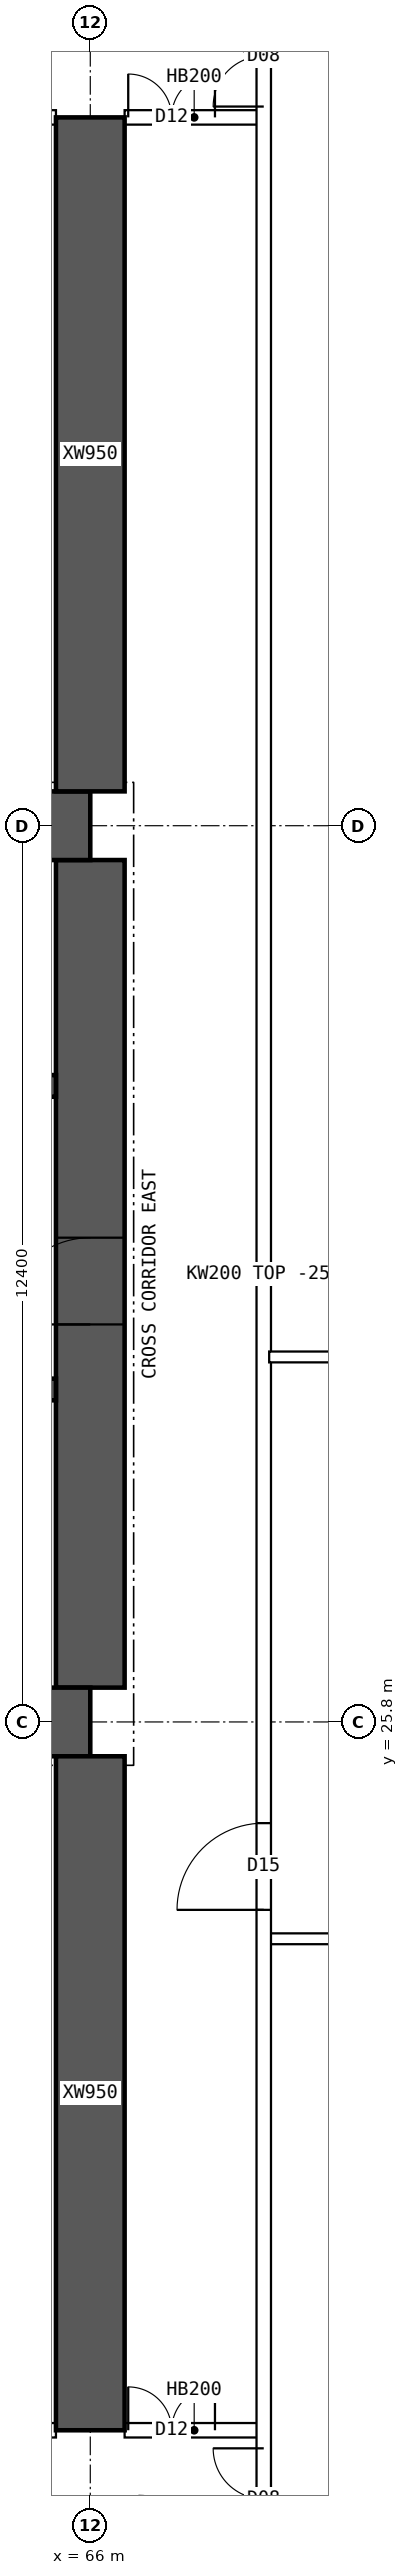
"""IFC4 building model, lengths in metres.
Left out: names, types, materials, properties, quantities, classifications, styles, units other than length and angle.
Written with IfcOpenShell. Run it as: python <this file> out.ifc"""

import sys

from ifc_helpers import new_model, si_unit, direction, frame, frame_2d, origin, place, context, subcontext, project, spatial, polyline, rectangle, outline, extrude, element, fill, save


model = new_model("IFC4")
c1 = context("Model", 3, precision=1e-05, world=origin(), true_north=direction((0.0, 1.0)))
c2 = subcontext(c1, "Body", "Model", "MODEL_VIEW")
j1 = project(units=[si_unit("LENGTHUNIT", "METRE"), si_unit("PLANEANGLEUNIT", "RADIAN")], contexts=[c1])
p1 = place(None, origin())
s1 = spatial("IfcSite", under=j1, at=p1, CompositionType="ELEMENT")
p2 = place(p1, origin())
s2 = spatial("IfcBuilding", under=s1, at=p2, CompositionType="ELEMENT")
p3 = place(p2, frame((0.0, 0.0, 118.15)))
s3 = spatial("IfcBuildingStorey", under=s2, at=p3, CompositionType="ELEMENT", Elevation=118.15)
for number, where, z_axis, x_axis in (
    (1, (18.0, 25.8, 0.0), (0.0, 0.0, 1.0), (1.0, 0.0, 0.0)),
    (2, (18.0, 38.2, 0.0), (0.0, 0.0, 1.0), (1.0, 0.0, 0.0)),
):
    element("IfcWall", number, at=place(p3, frame(where, z_axis=z_axis, x_axis=x_axis)), inside=s3, PredefinedType="SHEAR", context=c2, shape_type="SweptSolid", body=[
        extrude(rectangle(XDim=48.0, YDim=0.95, at=frame_2d((24.0, 0.0))), origin(), (0.0, 0.0, 1.0), 3.75),
    ])
p4 = place(p3, frame((66.0, 26.275, 0.0), z_axis=(0.0, 0.0, 1.0), x_axis=(0.0, 1.0, 0.0)))
e3 = element("IfcWall", 3, at=p4, inside=s3, PredefinedType="SHEAR", context=c2, shape_type="SweptSolid", body=[
    extrude(rectangle(XDim=11.45, YDim=0.95, at=frame_2d((5.725, 0.0))), origin(), (0.0, 0.0, 1.0), 3.75),
])
p5 = place(p4, frame((5.025, 0.0, 0.0)))
e4 = element("IfcOpeningElement", 4, at=p5, cuts=e3, PredefinedType="OPENING", context=c2, shape_type="SweptSolid", body=[
    extrude(rectangle(XDim=1.2, YDim=2.1, at=frame_2d((0.6, 1.05))), frame((0.0, 0.485, 0.0), z_axis=(0.0, -1.0, 0.0), x_axis=(1.0, 0.0, 0.0)), (0.0, 0.0, 1.0), 0.97),
])
p6 = place(p3, frame((18.475, 30.4, 0.0), z_axis=(0.0, 0.0, 1.0), x_axis=(1.0, 0.0, 0.0)))
e5 = element("IfcWall", 5, at=p6, inside=s3, PredefinedType="SHEAR", context=c2, shape_type="SweptSolid", body=[
    extrude(rectangle(XDim=47.05, YDim=0.3, at=frame_2d((23.525, 0.0))), origin(), (0.0, 0.0, 1.0), 3.75),
])
p7 = place(p6, frame((0.4, 0.0, 0.0)))
e6 = element("IfcOpeningElement", 6, at=p7, cuts=e5, PredefinedType="OPENING", context=c2, shape_type="SweptSolid", body=[
    extrude(rectangle(XDim=1.0, YDim=2.1, at=frame_2d((0.5, 1.05))), frame((0.0, 0.16, 0.0), z_axis=(0.0, -1.0, 0.0), x_axis=(1.0, 0.0, 0.0)), (0.0, 0.0, 1.0), 0.32),
])
p8 = place(p6, frame((45.65, 0.0, 0.0)))
e7 = element("IfcOpeningElement", 7, at=p8, cuts=e5, PredefinedType="OPENING", context=c2, shape_type="SweptSolid", body=[
    extrude(rectangle(XDim=1.0, YDim=2.1, at=frame_2d((0.5, 1.05))), frame((0.0, 0.16, 0.0), z_axis=(0.0, -1.0, 0.0), x_axis=(1.0, 0.0, 0.0)), (0.0, 0.0, 1.0), 0.32),
])
p9 = place(p6, frame((8.275, 0.0, 0.0)))
e8 = element("IfcOpeningElement", 8, at=p9, cuts=e5, PredefinedType="OPENING", context=c2, shape_type="SweptSolid", body=[
    extrude(rectangle(XDim=1.1, YDim=2.1, at=frame_2d((0.55, 1.05))), frame((0.0, 0.16, 0.0), z_axis=(0.0, -1.0, 0.0), x_axis=(1.0, 0.0, 0.0)), (0.0, 0.0, 1.0), 0.32),
])
p10 = place(p6, frame((10.875, 0.0, 0.0)))
e9 = element("IfcOpeningElement", 9, at=p10, cuts=e5, PredefinedType="OPENING", context=c2, shape_type="SweptSolid", body=[
    extrude(rectangle(XDim=1.1, YDim=2.1, at=frame_2d((0.55, 1.05))), frame((0.0, 0.16, 0.0), z_axis=(0.0, -1.0, 0.0), x_axis=(1.0, 0.0, 0.0)), (0.0, 0.0, 1.0), 0.32),
])
p11 = place(p6, frame((13.475, 0.0, 0.0)))
e10 = element("IfcOpeningElement", 10, at=p11, cuts=e5, PredefinedType="OPENING", context=c2, shape_type="SweptSolid", body=[
    extrude(rectangle(XDim=1.1, YDim=2.1, at=frame_2d((0.55, 1.05))), frame((0.0, 0.16, 0.0), z_axis=(0.0, -1.0, 0.0), x_axis=(1.0, 0.0, 0.0)), (0.0, 0.0, 1.0), 0.32),
])
p12 = place(p6, frame((16.075, 0.0, 0.0)))
e11 = element("IfcOpeningElement", 11, at=p12, cuts=e5, PredefinedType="OPENING", context=c2, shape_type="SweptSolid", body=[
    extrude(rectangle(XDim=1.1, YDim=2.1, at=frame_2d((0.55, 1.05))), frame((0.0, 0.16, 0.0), z_axis=(0.0, -1.0, 0.0), x_axis=(1.0, 0.0, 0.0)), (0.0, 0.0, 1.0), 0.32),
])
p13 = place(p6, frame((18.85, 0.0, 0.0)))
e12 = element("IfcOpeningElement", 12, at=p13, cuts=e5, PredefinedType="OPENING", context=c2, shape_type="SweptSolid", body=[
    extrude(rectangle(XDim=0.9, YDim=2.1, at=frame_2d((0.45, 1.05))), frame((0.0, 0.16, 0.0), z_axis=(0.0, -1.0, 0.0), x_axis=(1.0, 0.0, 0.0)), (0.0, 0.0, 1.0), 0.32),
])
p14 = place(p6, frame((30.142, 0.0, 0.0)))
e13 = element("IfcOpeningElement", 13, at=p14, cuts=e5, PredefinedType="OPENING", context=c2, shape_type="SweptSolid", body=[
    extrude(rectangle(XDim=1.1, YDim=2.1, at=frame_2d((0.55, 1.05))), frame((0.0, 0.16, 0.0), z_axis=(0.0, -1.0, 0.0), x_axis=(1.0, 0.0, 0.0)), (0.0, 0.0, 1.0), 0.32),
])
p15 = place(p6, frame((33.675, 0.0, 0.0)))
e14 = element("IfcOpeningElement", 14, at=p15, cuts=e5, PredefinedType="OPENING", context=c2, shape_type="SweptSolid", body=[
    extrude(rectangle(XDim=1.1, YDim=2.1, at=frame_2d((0.55, 1.05))), frame((0.0, 0.16, 0.0), z_axis=(0.0, -1.0, 0.0), x_axis=(1.0, 0.0, 0.0)), (0.0, 0.0, 1.0), 0.32),
])
p16 = place(p6, frame((37.208, 0.0, 0.0)))
e15 = element("IfcOpeningElement", 15, at=p16, cuts=e5, PredefinedType="OPENING", context=c2, shape_type="SweptSolid", body=[
    extrude(rectangle(XDim=1.1, YDim=2.1, at=frame_2d((0.55, 1.05))), frame((0.0, 0.16, 0.0), z_axis=(0.0, -1.0, 0.0), x_axis=(1.0, 0.0, 0.0)), (0.0, 0.0, 1.0), 0.32),
])
p17 = place(p3, frame((18.475, 34.6, 0.0), z_axis=(0.0, 0.0, 1.0), x_axis=(1.0, 0.0, 0.0)))
e16 = element("IfcWall", 16, at=p17, inside=s3, PredefinedType="SHEAR", context=c2, shape_type="SweptSolid", body=[
    extrude(rectangle(XDim=47.05, YDim=0.3, at=frame_2d((23.525, 0.0))), origin(), (0.0, 0.0, 1.0), 3.75),
])
p18 = place(p17, frame((0.9, 0.0, 0.0)))
e17 = element("IfcOpeningElement", 17, at=p18, cuts=e16, PredefinedType="OPENING", context=c2, shape_type="SweptSolid", body=[
    extrude(rectangle(XDim=1.1, YDim=2.1, at=frame_2d((0.55, 1.05))), frame((0.0, 0.16, 0.0), z_axis=(0.0, -1.0, 0.0), x_axis=(1.0, 0.0, 0.0)), (0.0, 0.0, 1.0), 0.32),
])
p19 = place(p17, frame((45.05, 0.0, 0.0)))
e18 = element("IfcOpeningElement", 18, at=p19, cuts=e16, PredefinedType="OPENING", context=c2, shape_type="SweptSolid", body=[
    extrude(rectangle(XDim=1.1, YDim=2.1, at=frame_2d((0.55, 1.05))), frame((0.0, 0.16, 0.0), z_axis=(0.0, -1.0, 0.0), x_axis=(1.0, 0.0, 0.0)), (0.0, 0.0, 1.0), 0.32),
])
p20 = place(p17, frame((4.125, 0.0, 0.0)))
e19 = element("IfcOpeningElement", 19, at=p20, cuts=e16, PredefinedType="OPENING", context=c2, shape_type="SweptSolid", body=[
    extrude(rectangle(XDim=0.9, YDim=2.1, at=frame_2d((0.45, 1.05))), frame((0.0, 0.16, 0.0), z_axis=(0.0, -1.0, 0.0), x_axis=(1.0, 0.0, 0.0)), (0.0, 0.0, 1.0), 0.32),
])
p21 = place(p17, frame((42.025, 0.0, 0.0)))
e20 = element("IfcOpeningElement", 20, at=p21, cuts=e16, PredefinedType="OPENING", context=c2, shape_type="SweptSolid", body=[
    extrude(rectangle(XDim=0.9, YDim=2.1, at=frame_2d((0.45, 1.05))), frame((0.0, 0.16, 0.0), z_axis=(0.0, -1.0, 0.0), x_axis=(1.0, 0.0, 0.0)), (0.0, 0.0, 1.0), 0.32),
])
p22 = place(p17, frame((8.9, 0.0, 0.0)))
e21 = element("IfcOpeningElement", 21, at=p22, cuts=e16, PredefinedType="OPENING", context=c2, shape_type="SweptSolid", body=[
    extrude(rectangle(XDim=0.9, YDim=2.1, at=frame_2d((0.45, 1.05))), frame((0.0, 0.16, 0.0), z_axis=(0.0, -1.0, 0.0), x_axis=(1.0, 0.0, 0.0)), (0.0, 0.0, 1.0), 0.32),
])
p23 = place(p17, frame((12.874, 0.0, 0.0)))
e22 = element("IfcOpeningElement", 22, at=p23, cuts=e16, PredefinedType="OPENING", context=c2, shape_type="SweptSolid", body=[
    extrude(rectangle(XDim=0.9, YDim=2.1, at=frame_2d((0.45, 1.05))), frame((0.0, 0.16, 0.0), z_axis=(0.0, -1.0, 0.0), x_axis=(1.0, 0.0, 0.0)), (0.0, 0.0, 1.0), 0.32),
])
p24 = place(p17, frame((16.521, 0.0, 0.0)))
e23 = element("IfcOpeningElement", 23, at=p24, cuts=e16, PredefinedType="OPENING", context=c2, shape_type="SweptSolid", body=[
    extrude(rectangle(XDim=0.9, YDim=2.1, at=frame_2d((0.45, 1.05))), frame((0.0, 0.16, 0.0), z_axis=(0.0, -1.0, 0.0), x_axis=(1.0, 0.0, 0.0)), (0.0, 0.0, 1.0), 0.32),
])
p25 = place(p17, frame((20.28, 0.0, 0.0)))
e24 = element("IfcOpeningElement", 24, at=p25, cuts=e16, PredefinedType="OPENING", context=c2, shape_type="SweptSolid", body=[
    extrude(rectangle(XDim=0.9, YDim=2.1, at=frame_2d((0.45, 1.05))), frame((0.0, 0.16, 0.0), z_axis=(0.0, -1.0, 0.0), x_axis=(1.0, 0.0, 0.0)), (0.0, 0.0, 1.0), 0.32),
])
p26 = place(p17, frame((24.686, 0.0, 0.0)))
e25 = element("IfcOpeningElement", 25, at=p26, cuts=e16, PredefinedType="OPENING", context=c2, shape_type="SweptSolid", body=[
    extrude(rectangle(XDim=0.9, YDim=2.1, at=frame_2d((0.45, 1.05))), frame((0.0, 0.16, 0.0), z_axis=(0.0, -1.0, 0.0), x_axis=(1.0, 0.0, 0.0)), (0.0, 0.0, 1.0), 0.32),
])
p27 = place(p17, frame((27.483, 0.0, 0.0)))
e26 = element("IfcOpeningElement", 26, at=p27, cuts=e16, PredefinedType="OPENING", context=c2, shape_type="SweptSolid", body=[
    extrude(rectangle(XDim=0.9, YDim=2.1, at=frame_2d((0.45, 1.05))), frame((0.0, 0.16, 0.0), z_axis=(0.0, -1.0, 0.0), x_axis=(1.0, 0.0, 0.0)), (0.0, 0.0, 1.0), 0.32),
])
p28 = place(p17, frame((29.856, 0.0, 0.0)))
e27 = element("IfcOpeningElement", 27, at=p28, cuts=e16, PredefinedType="OPENING", context=c2, shape_type="SweptSolid", body=[
    extrude(rectangle(XDim=0.9, YDim=2.1, at=frame_2d((0.45, 1.05))), frame((0.0, 0.16, 0.0), z_axis=(0.0, -1.0, 0.0), x_axis=(1.0, 0.0, 0.0)), (0.0, 0.0, 1.0), 0.32),
])
p29 = place(p17, frame((33.706, 0.0, 0.0)))
e28 = element("IfcOpeningElement", 28, at=p29, cuts=e16, PredefinedType="OPENING", context=c2, shape_type="SweptSolid", body=[
    extrude(rectangle(XDim=0.9, YDim=2.1, at=frame_2d((0.45, 1.05))), frame((0.0, 0.16, 0.0), z_axis=(0.0, -1.0, 0.0), x_axis=(1.0, 0.0, 0.0)), (0.0, 0.0, 1.0), 0.32),
])
p30 = place(p17, frame((37.454, 0.0, 0.0)))
e29 = element("IfcOpeningElement", 29, at=p30, cuts=e16, PredefinedType="OPENING", context=c2, shape_type="SweptSolid", body=[
    extrude(rectangle(XDim=0.9, YDim=2.1, at=frame_2d((0.45, 1.05))), frame((0.0, 0.16, 0.0), z_axis=(0.0, -1.0, 0.0), x_axis=(1.0, 0.0, 0.0)), (0.0, 0.0, 1.0), 0.32),
])
for number, where, z_axis, x_axis in (
    (30, (66.0, 16.0, 0.0), (0.0, 0.0, 1.0), (0.0, 1.0, 0.0)),
    (31, (66.0, 38.675, 0.0), (0.0, 0.0, 1.0), (0.0, 1.0, 0.0)),
):
    element("IfcWall", number, at=place(p3, frame(where, z_axis=z_axis, x_axis=x_axis)), inside=s3, PredefinedType="SHEAR", context=c2, shape_type="SweptSolid", body=[
        extrude(rectangle(XDim=9.325, YDim=0.95, at=frame_2d((4.663, 0.0))), origin(), (0.0, 0.0, 1.0), 3.75),
    ])
p31 = place(p3, frame((60.475, 16.0, 0.0), z_axis=(0.0, 0.0, 1.0), x_axis=(1.0, 0.0, 0.0)))
e32 = element("IfcWall", 32, at=p31, inside=s3, PredefinedType="SOLIDWALL", context=c2, shape_type="SweptSolid", body=[
    extrude(rectangle(XDim=5.05, YDim=0.2, at=frame_2d((2.525, 0.0))), origin(), (0.0, 0.0, 1.0), 3.5),
])
p32 = place(p31, frame((0.15, 0.0, 0.0)))
e33 = element("IfcOpeningElement", 33, at=p32, cuts=e32, PredefinedType="OPENING", context=c2, shape_type="SweptSolid", body=[
    extrude(rectangle(XDim=0.9, YDim=2.1, at=frame_2d((0.45, 1.05))), frame((0.0, 0.11, 0.0), z_axis=(0.0, -1.0, 0.0), x_axis=(1.0, 0.0, 0.0)), (0.0, 0.0, 1.0), 0.22),
])
p33 = place(p31, frame((3.235, 0.0, 0.0)))
e34 = element("IfcOpeningElement", 34, at=p33, cuts=e32, PredefinedType="OPENING", context=c2, shape_type="SweptSolid", body=[
    extrude(rectangle(XDim=0.9, YDim=2.1, at=frame_2d((0.45, 1.05))), frame((0.0, 0.11, 0.0), z_axis=(0.0, -1.0, 0.0), x_axis=(1.0, 0.0, 0.0)), (0.0, 0.0, 1.0), 0.22),
])
p34 = place(p3, frame((66.475, 16.0, 0.0), z_axis=(0.0, 0.0, 1.0), x_axis=(1.0, 0.0, 0.0)))
e35 = element("IfcWall", 35, at=p34, inside=s3, PredefinedType="SOLIDWALL", context=c2, shape_type="SweptSolid", body=[
    extrude(rectangle(XDim=1.925, YDim=0.2, at=frame_2d((0.962, 0.0))), origin(), (0.0, 0.0, 1.0), 3.5),
])
p35 = place(p34, frame((0.05, 0.0, 0.0)))
e36 = element("IfcOpeningElement", 36, at=p35, cuts=e35, PredefinedType="OPENING", context=c2, shape_type="SweptSolid", body=[
    extrude(rectangle(XDim=1.2, YDim=2.1, at=frame_2d((0.6, 1.05))), frame((0.0, 0.11, 0.0), z_axis=(0.0, -1.0, 0.0), x_axis=(1.0, 0.0, 0.0)), (0.0, 0.0, 1.0), 0.22),
])
p36 = place(p3, frame((60.475, 48.0, 0.0), z_axis=(0.0, 0.0, 1.0), x_axis=(1.0, 0.0, 0.0)))
e37 = element("IfcWall", 37, at=p36, inside=s3, PredefinedType="SOLIDWALL", context=c2, shape_type="SweptSolid", body=[
    extrude(rectangle(XDim=5.05, YDim=0.2, at=frame_2d((2.525, 0.0))), origin(), (0.0, 0.0, 1.0), 3.5),
])
p37 = place(p36, frame((0.15, 0.0, 0.0)))
e38 = element("IfcOpeningElement", 38, at=p37, cuts=e37, PredefinedType="OPENING", context=c2, shape_type="SweptSolid", body=[
    extrude(rectangle(XDim=0.9, YDim=2.1, at=frame_2d((0.45, 1.05))), frame((0.0, 0.11, 0.0), z_axis=(0.0, -1.0, 0.0), x_axis=(1.0, 0.0, 0.0)), (0.0, 0.0, 1.0), 0.22),
])
p38 = place(p36, frame((3.285, 0.0, 0.0)))
e39 = element("IfcOpeningElement", 39, at=p38, cuts=e37, PredefinedType="OPENING", context=c2, shape_type="SweptSolid", body=[
    extrude(rectangle(XDim=0.9, YDim=2.1, at=frame_2d((0.45, 1.05))), frame((0.0, 0.11, 0.0), z_axis=(0.0, -1.0, 0.0), x_axis=(1.0, 0.0, 0.0)), (0.0, 0.0, 1.0), 0.22),
])
p39 = place(p3, frame((66.475, 48.0, 0.0), z_axis=(0.0, 0.0, 1.0), x_axis=(1.0, 0.0, 0.0)))
e40 = element("IfcWall", 40, at=p39, inside=s3, PredefinedType="SOLIDWALL", context=c2, shape_type="SweptSolid", body=[
    extrude(rectangle(XDim=1.925, YDim=0.2, at=frame_2d((0.962, 0.0))), origin(), (0.0, 0.0, 1.0), 3.5),
])
p40 = place(p39, frame((0.05, 0.0, 0.0)))
e41 = element("IfcOpeningElement", 41, at=p40, cuts=e40, PredefinedType="OPENING", context=c2, shape_type="SweptSolid", body=[
    extrude(rectangle(XDim=1.2, YDim=2.1, at=frame_2d((0.6, 1.05))), frame((0.0, 0.11, 0.0), z_axis=(0.0, -1.0, 0.0), x_axis=(1.0, 0.0, 0.0)), (0.0, 0.0, 1.0), 0.22),
])
p41 = place(p3, frame((68.475, 30.85, 0.0), z_axis=(0.0, 0.0, 1.0), x_axis=(1.0, 0.0, 0.0)))
e42 = element("IfcWall", 42, at=p41, inside=s3, PredefinedType="PARTITIONING", context=c2, shape_type="SweptSolid", body=[
    extrude(outline(polyline([(0.0, 0.0), (6.82, 0.0), (6.82, 3.5), (3.827, 3.5), (3.825, 3.05), (3.227, 3.05), (3.225, 3.5), (0.0, 3.5), (0.0, 0.0)])), frame((0.0, 0.075, 0.0), z_axis=(0.0, -1.0, 0.0), x_axis=(1.0, 0.0, 0.0)), (0.0, 0.0, 1.0), 0.15),
])
p42 = place(p3, frame((68.4, 9.405, 0.0), z_axis=(0.0, 0.0, 1.0), x_axis=(0.0, 1.0, 0.0)))
e43 = element("IfcWall", 43, at=p42, inside=s3, PredefinedType="SOLIDWALL", context=c2, shape_type="SweptSolid", body=[
    extrude(rectangle(XDim=45.189, YDim=0.2, at=frame_2d((22.595, 0.0))), origin(), (0.0, 0.0, 1.0), 3.5),
])
p43 = place(p42, frame((13.795, 0.0, 0.0)))
e44 = element("IfcOpeningElement", 44, at=p43, cuts=e43, PredefinedType="OPENING", context=c2, shape_type="SweptSolid", body=[
    extrude(rectangle(XDim=1.2, YDim=2.1, at=frame_2d((0.6, 1.05))), frame((0.0, 0.11, 0.0), z_axis=(0.0, -1.0, 0.0), x_axis=(1.0, 0.0, 0.0)), (0.0, 0.0, 1.0), 0.22),
])
p44 = place(p42, frame((4.945, 0.0, 0.0)))
e45 = element("IfcOpeningElement", 45, at=p44, cuts=e43, PredefinedType="OPENING", context=c2, shape_type="SweptSolid", body=[
    extrude(rectangle(XDim=1.4, YDim=2.1, at=frame_2d((0.7, 1.05))), frame((0.0, 0.11, 0.0), z_axis=(0.0, -1.0, 0.0), x_axis=(1.0, 0.0, 0.0)), (0.0, 0.0, 1.0), 0.22),
])
p45 = place(p42, frame((38.745, 0.0, 0.0)))
e46 = element("IfcOpeningElement", 46, at=p45, cuts=e43, PredefinedType="OPENING", context=c2, shape_type="SweptSolid", body=[
    extrude(rectangle(XDim=1.4, YDim=2.1, at=frame_2d((0.7, 1.05))), frame((0.0, 0.11, 0.0), z_axis=(0.0, -1.0, 0.0), x_axis=(1.0, 0.0, 0.0)), (0.0, 0.0, 1.0), 0.22),
])
p46 = place(p3, frame((68.475, 22.8, 0.0), z_axis=(0.0, 0.0, 1.0), x_axis=(1.0, 0.0, 0.0)))
e47 = element("IfcWall", 47, at=p46, inside=s3, PredefinedType="PARTITIONING", context=c2, shape_type="SweptSolid", body=[
    extrude(outline(polyline([(0.0, 0.0), (6.82, 0.0), (6.82, 3.5), (3.827, 3.5), (3.825, 3.05), (3.227, 3.05), (3.225, 3.5), (0.0, 3.5), (0.0, 0.0)])), frame((0.0, 0.075, 0.0), z_axis=(0.0, -1.0, 0.0), x_axis=(1.0, 0.0, 0.0)), (0.0, 0.0, 1.0), 0.15),
])
p47 = place(p5, origin())
e48 = element("IfcDoor", 48, at=p47, inside=s3, OperationType="SINGLE_SWING_LEFT", PredefinedType="DOOR", context=c2, shape_type="SweptSolid", body=[
    extrude(rectangle(XDim=1.2, YDim=2.1, at=frame_2d((0.6, 1.05))), frame((0.0, 0.025, 0.0), z_axis=(0.0, -1.0, 0.0), x_axis=(1.0, 0.0, 0.0)), (0.0, 0.0, 1.0), 0.05),
])
fill(e4, e48)
p48 = place(p35, origin())
e49 = element("IfcDoor", 49, at=p48, inside=s3, OperationType="DOUBLE_DOOR_SINGLE_SWING", PredefinedType="DOOR", context=c2, shape_type="SweptSolid", body=[
    extrude(rectangle(XDim=1.2, YDim=2.1, at=frame_2d((0.6, 1.05))), frame((0.0, 0.025, 0.0), z_axis=(0.0, -1.0, 0.0), x_axis=(1.0, 0.0, 0.0)), (0.0, 0.0, 1.0), 0.05),
])
fill(e36, e49)
p49 = place(p40, origin())
e50 = element("IfcDoor", 50, at=p49, inside=s3, OperationType="DOUBLE_DOOR_SINGLE_SWING", PredefinedType="DOOR", context=c2, shape_type="SweptSolid", body=[
    extrude(rectangle(XDim=1.2, YDim=2.1, at=frame_2d((0.6, 1.05))), frame((0.0, 0.025, 0.0), z_axis=(0.0, -1.0, 0.0), x_axis=(1.0, 0.0, 0.0)), (0.0, 0.0, 1.0), 0.05),
])
fill(e41, e50)
p50 = place(p43, origin())
e51 = element("IfcDoor", 51, at=p50, inside=s3, OperationType="SINGLE_SWING_LEFT", PredefinedType="DOOR", context=c2, shape_type="SweptSolid", body=[
    extrude(rectangle(XDim=1.2, YDim=2.1, at=frame_2d((0.6, 1.05))), frame((0.0, 0.025, 0.0), z_axis=(0.0, -1.0, 0.0), x_axis=(1.0, 0.0, 0.0)), (0.0, 0.0, 1.0), 0.05),
])
fill(e44, e51)
p51 = place(p44, origin())
e52 = element("IfcDoor", 52, at=p51, inside=s3, OperationType="DOUBLE_DOOR_SINGLE_SWING", PredefinedType="DOOR", context=c2, shape_type="SweptSolid", body=[
    extrude(rectangle(XDim=1.4, YDim=2.1, at=frame_2d((0.7, 1.05))), frame((0.0, 0.025, 0.0), z_axis=(0.0, -1.0, 0.0), x_axis=(1.0, 0.0, 0.0)), (0.0, 0.0, 1.0), 0.05),
])
fill(e45, e52)
p52 = place(p45, origin())
e53 = element("IfcDoor", 53, at=p52, inside=s3, OperationType="DOUBLE_DOOR_SINGLE_SWING", PredefinedType="DOOR", context=c2, shape_type="SweptSolid", body=[
    extrude(rectangle(XDim=1.4, YDim=2.1, at=frame_2d((0.7, 1.05))), frame((0.0, 0.025, 0.0), z_axis=(0.0, -1.0, 0.0), x_axis=(1.0, 0.0, 0.0)), (0.0, 0.0, 1.0), 0.05),
])
fill(e46, e53)
save(model, sys.argv[1])
